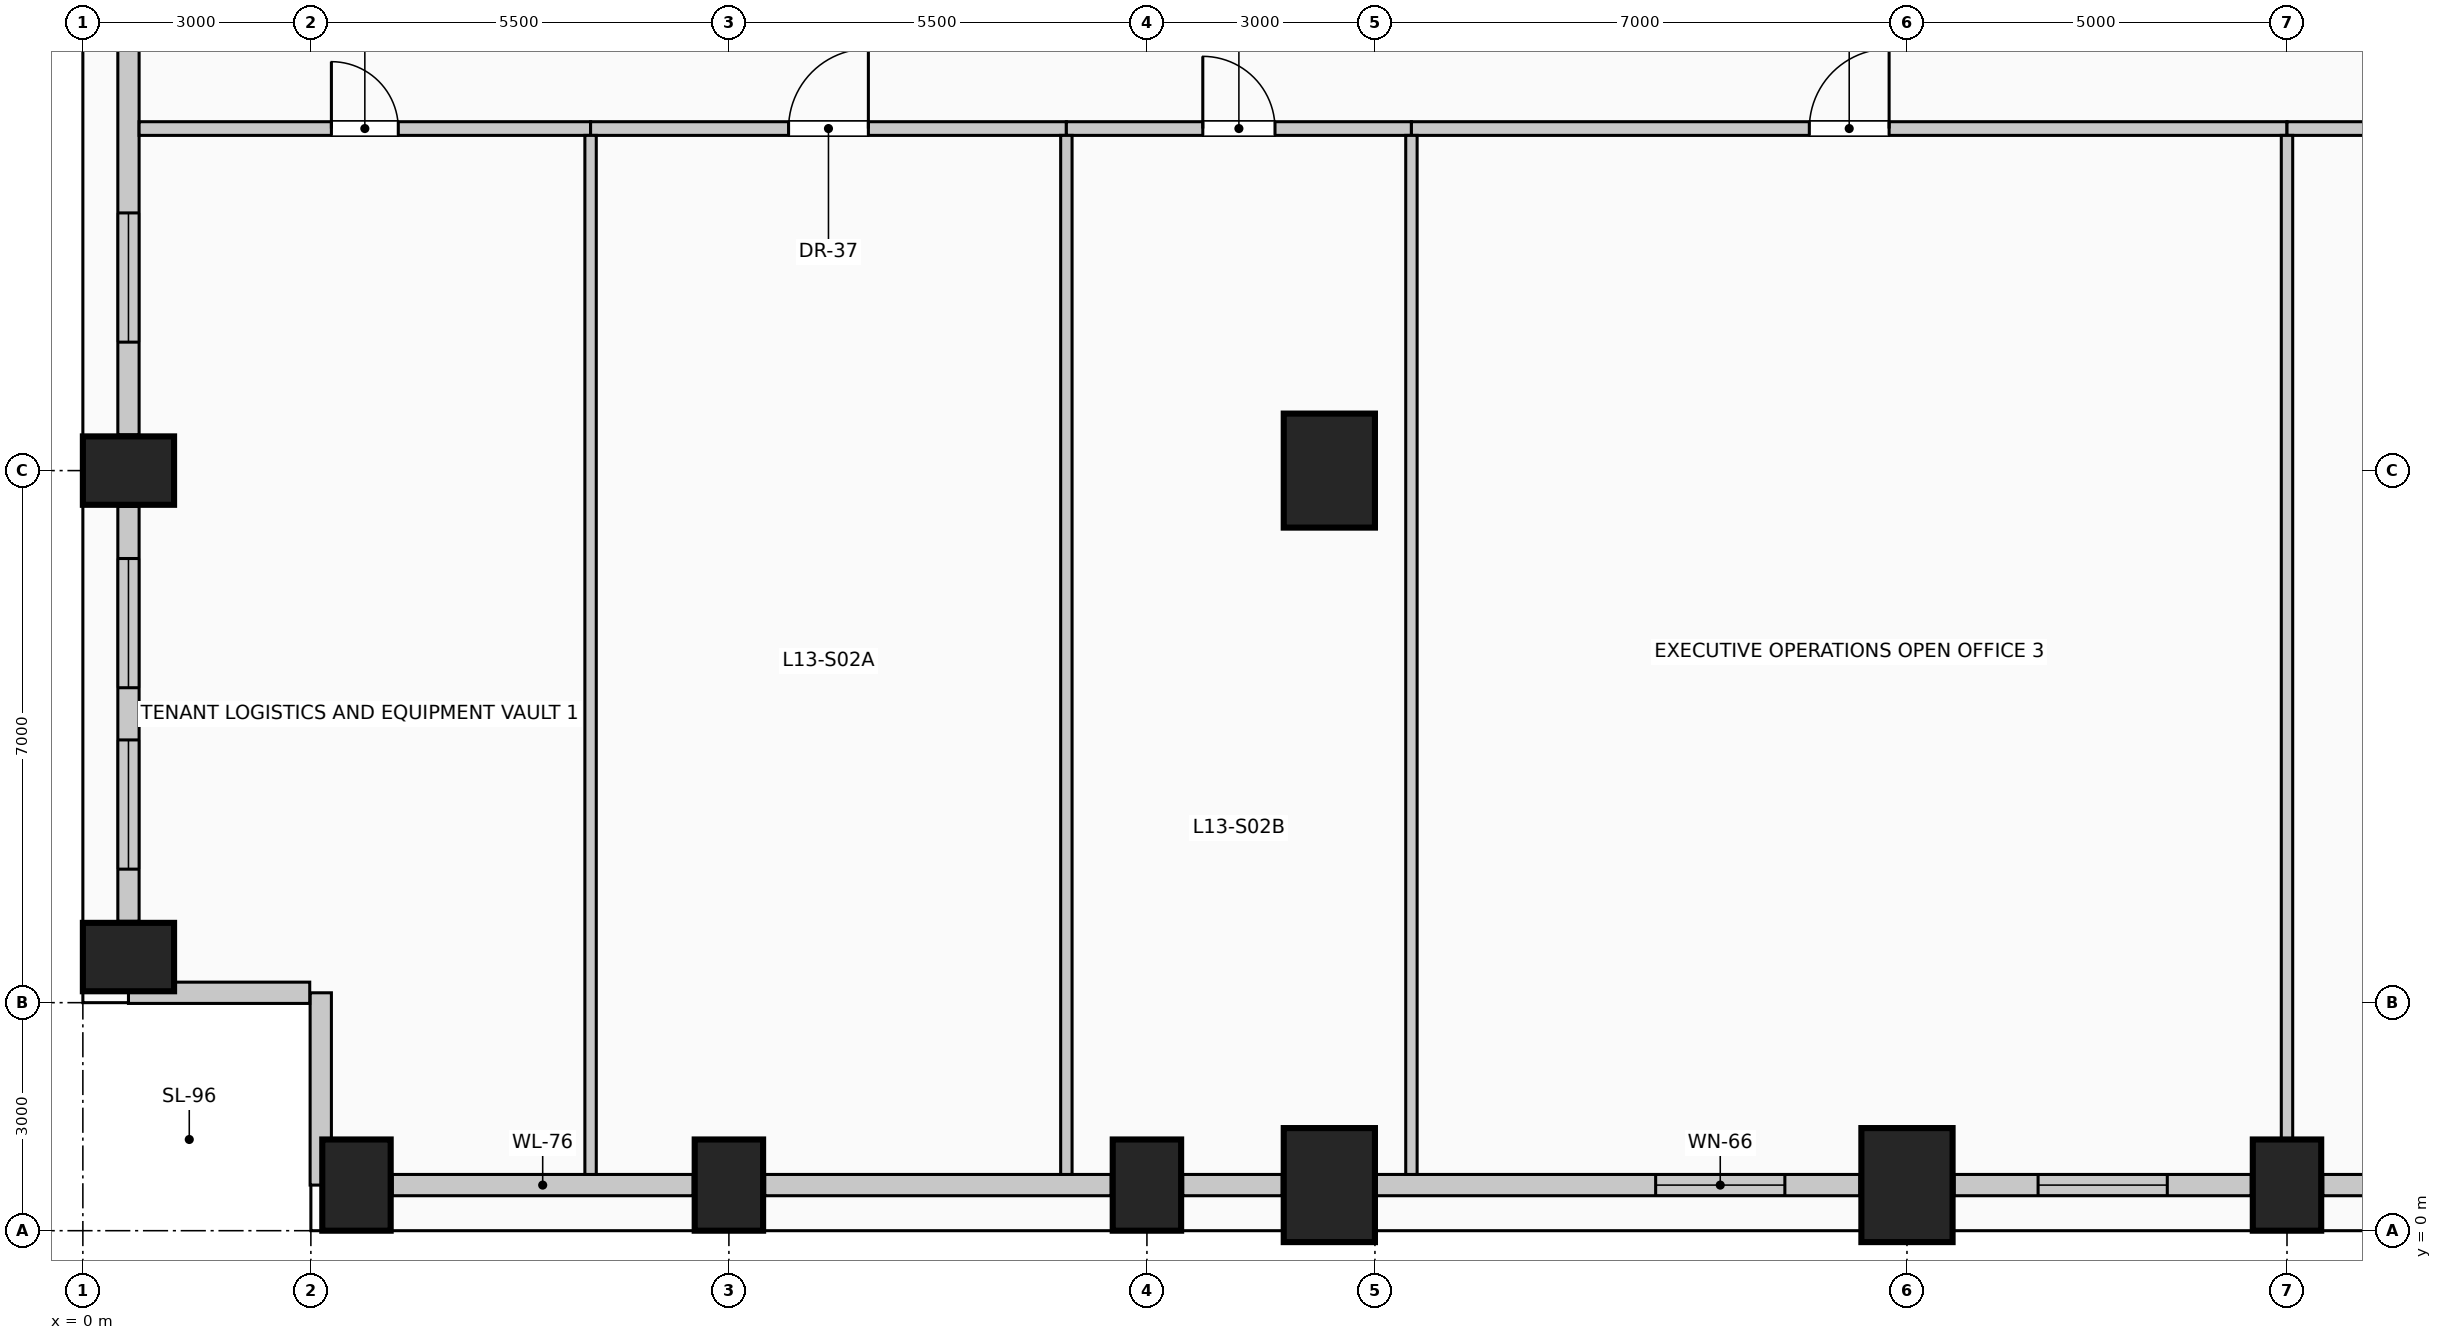
"""IFC4 building model, lengths in metres.
Left out: names, types, materials, properties, quantities, classifications, styles, units other than length and angle.
Written with IfcOpenShell. Run it as: python <this file> out.ifc"""

import sys

from ifc_helpers import new_model, si_unit, direction, frame, frame_2d, origin, origin_2d, place, context, subcontext, project, spatial, rectangle, extrude, element, fill, save


model = new_model("IFC4")
c1 = context("Model", 3, precision=1e-05, world=origin(), true_north=direction((0.0, 1.0)))
c2 = subcontext(c1, "Body", "Model", "MODEL_VIEW")
j1 = project(units=[si_unit("LENGTHUNIT", "METRE"), si_unit("PLANEANGLEUNIT", "RADIAN")], contexts=[c1])
p1 = place(None, origin())
s1 = spatial("IfcSite", under=j1, at=p1, CompositionType="ELEMENT")
p2 = place(p1, origin())
s2 = spatial("IfcBuilding", under=s1, at=p2, CompositionType="ELEMENT")
p3 = place(p2, frame((0.0, 0.0, 54.6)))
s3 = spatial("IfcBuildingStorey", under=s2, at=p3, CompositionType="ELEMENT", Elevation=54.6)
for number, where, z_axis, x_axis in (
    (1, (3.6, 0.6, 0.0), (0.0, 0.0, 1.0), (1.0, 0.0, 0.0)),
    (2, (8.5, 0.6, 0.0), (0.0, 0.0, 1.0), (1.0, 0.0, 0.0)),
    (3, (14.0, 0.6, 0.0), (0.0, 0.0, 1.0), (1.0, 0.0, 0.0)),
):
    element("IfcColumn", number, at=place(p3, frame(where, z_axis=z_axis, x_axis=x_axis)), inside=s3, PredefinedType="COLUMN", context=c2, shape_type="SweptSolid", body=[
        extrude(rectangle(XDim=0.9, YDim=1.2, at=origin_2d()), origin(), (0.0, 0.0, 1.0), 4.0),
    ])
for number, where, z_axis, x_axis in (
    (4, (16.4, 0.6, 0.0), (0.0, 0.0, 1.0), (1.0, 0.0, 0.0)),
    (5, (24.0, 0.6, 0.0), (0.0, 0.0, 1.0), (1.0, 0.0, 0.0)),
):
    element("IfcColumn", number, at=place(p3, frame(where, z_axis=z_axis, x_axis=x_axis)), inside=s3, PredefinedType="COLUMN", context=c2, shape_type="SweptSolid", body=[
        extrude(rectangle(XDim=1.2, YDim=1.5, at=origin_2d()), origin(), (0.0, 0.0, 1.0), 4.0),
    ])
for number, where, z_axis, x_axis in (
    (6, (29.0, 0.6, 0.0), (0.0, 0.0, 1.0), (1.0, 0.0, 0.0)),
    (7, (0.6, 3.6, 0.0), (0.0, 0.0, 1.0), (0.0, 1.0, 0.0)),
    (8, (0.6, 10.0, 0.0), (0.0, 0.0, 1.0), (0.0, 1.0, 0.0)),
):
    element("IfcColumn", number, at=place(p3, frame(where, z_axis=z_axis, x_axis=x_axis)), inside=s3, PredefinedType="COLUMN", context=c2, shape_type="SweptSolid", body=[
        extrude(rectangle(XDim=0.9, YDim=1.2, at=origin_2d()), origin(), (0.0, 0.0, 1.0), 4.0),
    ])
p4 = place(p3, frame((16.4, 10.0, 0.0), z_axis=(0.0, 0.0, 1.0), x_axis=(1.0, 0.0, 0.0)))
e9 = element("IfcColumn", 9, at=p4, inside=s3, PredefinedType="COLUMN", context=c2, shape_type="SweptSolid", body=[
    extrude(rectangle(XDim=1.2, YDim=1.5, at=origin_2d()), origin(), (0.0, 0.0, 1.0), 4.0),
])
p5 = place(p3, frame((8.03, 0.6, 0.0), z_axis=(0.0, 0.0, 1.0), x_axis=(-1.0, 0.0, 0.0)))
e10 = element("IfcWall", 10, at=p5, inside=s3, PredefinedType="SOLIDWALL", context=c2, shape_type="SweptSolid", body=[
    extrude(rectangle(XDim=3.96, YDim=0.28, at=frame_2d((1.98, 0.0))), origin(), (0.0, 0.0, 1.0), 2.85),
])
p6 = place(p3, frame((13.53, 0.6, 0.0), z_axis=(0.0, 0.0, 1.0), x_axis=(-1.0, 0.0, 0.0)))
e11 = element("IfcWall", 11, at=p6, inside=s3, PredefinedType="SOLIDWALL", context=c2, shape_type="SweptSolid", body=[
    extrude(rectangle(XDim=4.56, YDim=0.28, at=frame_2d((2.28, 0.0))), origin(), (0.0, 0.0, 1.0), 2.85),
])
p7 = place(p3, frame((15.78, 0.6, 0.0), z_axis=(0.0, 0.0, 1.0), x_axis=(-1.0, 0.0, 0.0)))
e12 = element("IfcWall", 12, at=p7, inside=s3, PredefinedType="SOLIDWALL", context=c2, shape_type="SweptSolid", body=[
    extrude(rectangle(XDim=1.31, YDim=0.28, at=frame_2d((0.655, 0.0))), origin(), (0.0, 0.0, 1.0), 2.85),
])
p8 = place(p3, frame((23.38, 0.6, 0.0), z_axis=(0.0, 0.0, 1.0), x_axis=(-1.0, 0.0, 0.0)))
e13 = element("IfcWall", 13, at=p8, inside=s3, PredefinedType="SOLIDWALL", context=c2, shape_type="SweptSolid", body=[
    extrude(rectangle(XDim=6.36, YDim=0.28, at=frame_2d((3.18, 0.0))), origin(), (0.0, 0.0, 1.0), 2.85),
])
p9 = place(p8, frame((0.987, 0.0, 0.5)))
e14 = element("IfcOpeningElement", 14, at=p9, cuts=e13, PredefinedType="OPENING", context=c2, shape_type="SweptSolid", body=[
    extrude(rectangle(XDim=1.7, YDim=1.95, at=frame_2d((0.85, 0.975))), frame((0.0, 0.15, 0.0), z_axis=(0.0, -1.0, 0.0), x_axis=(1.0, 0.0, 0.0)), (0.0, 0.0, 1.0), 0.3),
])
p10 = place(p3, frame((28.53, 0.6, 0.0), z_axis=(0.0, 0.0, 1.0), x_axis=(-1.0, 0.0, 0.0)))
e15 = element("IfcWall", 15, at=p10, inside=s3, PredefinedType="SOLIDWALL", context=c2, shape_type="SweptSolid", body=[
    extrude(rectangle(XDim=3.91, YDim=0.28, at=frame_2d((1.955, 0.0))), origin(), (0.0, 0.0, 1.0), 2.85),
])
p11 = place(p10, frame((1.105, 0.0, 0.5)))
e16 = element("IfcOpeningElement", 16, at=p11, cuts=e15, PredefinedType="OPENING", context=c2, shape_type="SweptSolid", body=[
    extrude(rectangle(XDim=1.7, YDim=1.95, at=frame_2d((0.85, 0.975))), frame((0.0, 0.15, 0.0), z_axis=(0.0, -1.0, 0.0), x_axis=(1.0, 0.0, 0.0)), (0.0, 0.0, 1.0), 0.3),
])
p12 = place(p3, frame((33.38, 0.6, 0.0), z_axis=(0.0, 0.0, 1.0), x_axis=(-1.0, 0.0, 0.0)))
e17 = element("IfcWall", 17, at=p12, inside=s3, PredefinedType="SOLIDWALL", context=c2, shape_type="SweptSolid", body=[
    extrude(rectangle(XDim=3.91, YDim=0.28, at=frame_2d((1.955, 0.0))), origin(), (0.0, 0.0, 1.0), 2.85),
])
p13 = place(p12, frame((1.105, 0.0, 0.5)))
e18 = element("IfcOpeningElement", 18, at=p13, cuts=e17, PredefinedType="OPENING", context=c2, shape_type="SweptSolid", body=[
    extrude(rectangle(XDim=1.7, YDim=1.95, at=frame_2d((0.85, 0.975))), frame((0.0, 0.15, 0.0), z_axis=(0.0, -1.0, 0.0), x_axis=(1.0, 0.0, 0.0)), (0.0, 0.0, 1.0), 0.3),
])
p14 = place(p3, frame((0.6, 4.07, 0.0), z_axis=(0.0, 0.0, 1.0), x_axis=(0.0, 1.0, 0.0)))
e19 = element("IfcWall", 19, at=p14, inside=s3, PredefinedType="SOLIDWALL", context=c2, shape_type="SweptSolid", body=[
    extrude(rectangle(XDim=5.46, YDim=0.28, at=frame_2d((2.73, 0.0))), origin(), (0.0, 0.0, 1.0), 2.85),
])
p15 = place(p14, frame((0.687, 0.0, 0.5)))
e20 = element("IfcOpeningElement", 20, at=p15, cuts=e19, PredefinedType="OPENING", context=c2, shape_type="SweptSolid", body=[
    extrude(rectangle(XDim=1.7, YDim=1.95, at=frame_2d((0.85, 0.975))), frame((0.0, 0.15, 0.0), z_axis=(0.0, -1.0, 0.0), x_axis=(1.0, 0.0, 0.0)), (0.0, 0.0, 1.0), 0.3),
])
p16 = place(p14, frame((3.073, 0.0, 0.5)))
e21 = element("IfcOpeningElement", 21, at=p16, cuts=e19, PredefinedType="OPENING", context=c2, shape_type="SweptSolid", body=[
    extrude(rectangle(XDim=1.7, YDim=1.95, at=frame_2d((0.85, 0.975))), frame((0.0, 0.15, 0.0), z_axis=(0.0, -1.0, 0.0), x_axis=(1.0, 0.0, 0.0)), (0.0, 0.0, 1.0), 0.3),
])
p17 = place(p3, frame((0.6, 10.47, 0.0), z_axis=(0.0, 0.0, 1.0), x_axis=(0.0, 1.0, 0.0)))
e22 = element("IfcWall", 22, at=p17, inside=s3, PredefinedType="SOLIDWALL", context=c2, shape_type="SweptSolid", body=[
    extrude(rectangle(XDim=7.06, YDim=0.28, at=frame_2d((3.53, 0.0))), origin(), (0.0, 0.0, 1.0), 2.85),
])
p18 = place(p17, frame((1.22, 0.0, 0.5)))
e23 = element("IfcOpeningElement", 23, at=p18, cuts=e22, PredefinedType="OPENING", context=c2, shape_type="SweptSolid", body=[
    extrude(rectangle(XDim=1.7, YDim=1.95, at=frame_2d((0.85, 0.975))), frame((0.0, 0.15, 0.0), z_axis=(0.0, -1.0, 0.0), x_axis=(1.0, 0.0, 0.0)), (0.0, 0.0, 1.0), 0.3),
])
p19 = place(p3, frame((3.13, 0.6, 0.0), z_axis=(0.0, 0.0, 1.0), x_axis=(0.0, 1.0, 0.0)))
e24 = element("IfcWall", 24, at=p19, inside=s3, PredefinedType="SOLIDWALL", context=c2, shape_type="SweptSolid", body=[
    extrude(rectangle(XDim=2.53, YDim=0.28, at=frame_2d((1.265, 0.0))), origin(), (0.0, 0.0, 1.0), 3.7),
])
p20 = place(p3, frame((2.985, 3.13, 0.0), z_axis=(0.0, 0.0, 1.0), x_axis=(-1.0, 0.0, 0.0)))
e25 = element("IfcWall", 25, at=p20, inside=s3, PredefinedType="SOLIDWALL", context=c2, shape_type="SweptSolid", body=[
    extrude(rectangle(XDim=2.385, YDim=0.28, at=frame_2d((1.192, 0.0))), origin(), (0.0, 0.0, 1.0), 3.7),
])
p21 = place(p3, frame((0.74, 14.5, 0.0), z_axis=(0.0, 0.0, 1.0), x_axis=(1.0, 0.0, 0.0)))
e26 = element("IfcWall", 26, at=p21, inside=s3, PredefinedType="PARTITIONING", context=c2, shape_type="SweptSolid", body=[
    extrude(rectangle(XDim=5.94, YDim=0.18, at=frame_2d((2.97, 0.0))), origin(), (0.0, 0.0, 1.0), 3.7),
])
p22 = place(p21, frame((2.53, 0.0, 0.0)))
e27 = element("IfcOpeningElement", 27, at=p22, cuts=e26, PredefinedType="OPENING", context=c2, shape_type="SweptSolid", body=[
    extrude(rectangle(XDim=0.88, YDim=2.1, at=frame_2d((0.44, 1.05))), frame((0.0, 0.1, 0.0), z_axis=(0.0, -1.0, 0.0), x_axis=(1.0, 0.0, 0.0)), (0.0, 0.0, 1.0), 0.2),
])
p23 = place(p3, frame((6.68, 14.5, 0.0), z_axis=(0.0, 0.0, 1.0), x_axis=(1.0, 0.0, 0.0)))
e28 = element("IfcWall", 28, at=p23, inside=s3, PredefinedType="PARTITIONING", context=c2, shape_type="SweptSolid", body=[
    extrude(rectangle(XDim=6.26, YDim=0.18, at=frame_2d((3.13, 0.0))), origin(), (0.0, 0.0, 1.0), 3.7),
])
p24 = place(p23, frame((2.605, 0.0, 0.0)))
e29 = element("IfcOpeningElement", 29, at=p24, cuts=e28, PredefinedType="OPENING", context=c2, shape_type="SweptSolid", body=[
    extrude(rectangle(XDim=1.05, YDim=2.15, at=frame_2d((0.525, 1.075))), frame((0.0, 0.1, 0.0), z_axis=(0.0, -1.0, 0.0), x_axis=(1.0, 0.0, 0.0)), (0.0, 0.0, 1.0), 0.2),
])
p25 = place(p3, frame((12.94, 14.5, 0.0), z_axis=(0.0, 0.0, 1.0), x_axis=(1.0, 0.0, 0.0)))
e30 = element("IfcWall", 30, at=p25, inside=s3, PredefinedType="PARTITIONING", context=c2, shape_type="SweptSolid", body=[
    extrude(rectangle(XDim=4.54, YDim=0.18, at=frame_2d((2.27, 0.0))), origin(), (0.0, 0.0, 1.0), 3.7),
])
p26 = place(p25, frame((1.795, 0.0, 0.0)))
e31 = element("IfcOpeningElement", 31, at=p26, cuts=e30, PredefinedType="OPENING", context=c2, shape_type="SweptSolid", body=[
    extrude(rectangle(XDim=0.95, YDim=2.15, at=frame_2d((0.475, 1.075))), frame((0.0, 0.1, 0.0), z_axis=(0.0, -1.0, 0.0), x_axis=(1.0, 0.0, 0.0)), (0.0, 0.0, 1.0), 0.2),
])
p27 = place(p3, frame((17.48, 14.5, 0.0), z_axis=(0.0, 0.0, 1.0), x_axis=(1.0, 0.0, 0.0)))
e32 = element("IfcWall", 32, at=p27, inside=s3, PredefinedType="PARTITIONING", context=c2, shape_type="SweptSolid", body=[
    extrude(rectangle(XDim=11.52, YDim=0.18, at=frame_2d((5.76, 0.0))), origin(), (0.0, 0.0, 1.0), 3.7),
])
p28 = place(p27, frame((5.235, 0.0, 0.0)))
e33 = element("IfcOpeningElement", 33, at=p28, cuts=e32, PredefinedType="OPENING", context=c2, shape_type="SweptSolid", body=[
    extrude(rectangle(XDim=1.05, YDim=2.15, at=frame_2d((0.525, 1.075))), frame((0.0, 0.1, 0.0), z_axis=(0.0, -1.0, 0.0), x_axis=(1.0, 0.0, 0.0)), (0.0, 0.0, 1.0), 0.2),
])
p29 = place(p3, frame((29.0, 14.5, 0.0), z_axis=(0.0, 0.0, 1.0), x_axis=(1.0, 0.0, 0.0)))
e34 = element("IfcWall", 34, at=p29, inside=s3, PredefinedType="PARTITIONING", context=c2, shape_type="SweptSolid", body=[
    extrude(rectangle(XDim=12.6, YDim=0.18, at=frame_2d((6.3, 0.0))), origin(), (0.0, 0.0, 1.0), 3.7),
])
p30 = place(p29, frame((5.825, 0.0, 0.0)))
e35 = element("IfcOpeningElement", 35, at=p30, cuts=e34, PredefinedType="OPENING", context=c2, shape_type="SweptSolid", body=[
    extrude(rectangle(XDim=0.95, YDim=2.15, at=frame_2d((0.475, 1.075))), frame((0.0, 0.1, 0.0), z_axis=(0.0, -1.0, 0.0), x_axis=(1.0, 0.0, 0.0)), (0.0, 0.0, 1.0), 0.2),
])
for number, where, z_axis, x_axis in (
    (36, (6.68, 0.74, 0.0), (0.0, 0.0, 1.0), (0.0, 1.0, 0.0)),
    (37, (12.94, 0.74, 0.0), (0.0, 0.0, 1.0), (0.0, 1.0, 0.0)),
    (38, (17.48, 0.74, 0.0), (0.0, 0.0, 1.0), (0.0, 1.0, 0.0)),
):
    element("IfcWall", number, at=place(p3, frame(where, z_axis=z_axis, x_axis=x_axis)), inside=s3, PredefinedType="PARTITIONING", context=c2, shape_type="SweptSolid", body=[
        extrude(rectangle(XDim=13.67, YDim=0.15, at=frame_2d((6.835, 0.0))), origin(), (0.0, 0.0, 1.0), 3.7),
    ])
p31 = place(p3, frame((29.0, 1.2, 0.0), z_axis=(0.0, 0.0, 1.0), x_axis=(0.0, 1.0, 0.0)))
e39 = element("IfcWall", 39, at=p31, inside=s3, PredefinedType="PARTITIONING", context=c2, shape_type="SweptSolid", body=[
    extrude(rectangle(XDim=13.21, YDim=0.15, at=frame_2d((6.605, 0.0))), origin(), (0.0, 0.0, 1.0), 2.995),
])
p32 = place(p9, origin())
e40 = element("IfcWindow", 40, at=p32, inside=s3, PartitioningType="SINGLE_PANEL", PredefinedType="WINDOW", context=c2, shape_type="SweptSolid", body=[
    extrude(rectangle(XDim=1.7, YDim=1.95, at=frame_2d((0.85, 0.975))), frame((0.0, 0.03, 0.0), z_axis=(0.0, -1.0, 0.0), x_axis=(1.0, 0.0, 0.0)), (0.0, 0.0, 1.0), 0.06),
])
fill(e14, e40)
p33 = place(p11, origin())
e41 = element("IfcWindow", 41, at=p33, inside=s3, PartitioningType="SINGLE_PANEL", PredefinedType="WINDOW", context=c2, shape_type="SweptSolid", body=[
    extrude(rectangle(XDim=1.7, YDim=1.95, at=frame_2d((0.85, 0.975))), frame((0.0, 0.03, 0.0), z_axis=(0.0, -1.0, 0.0), x_axis=(1.0, 0.0, 0.0)), (0.0, 0.0, 1.0), 0.06),
])
fill(e16, e41)
p34 = place(p15, origin())
e42 = element("IfcWindow", 42, at=p34, inside=s3, PartitioningType="SINGLE_PANEL", PredefinedType="WINDOW", context=c2, shape_type="SweptSolid", body=[
    extrude(rectangle(XDim=1.7, YDim=1.95, at=frame_2d((0.85, 0.975))), frame((0.0, 0.03, 0.0), z_axis=(0.0, -1.0, 0.0), x_axis=(1.0, 0.0, 0.0)), (0.0, 0.0, 1.0), 0.06),
])
fill(e20, e42)
p35 = place(p16, origin())
e43 = element("IfcWindow", 43, at=p35, inside=s3, PartitioningType="SINGLE_PANEL", PredefinedType="WINDOW", context=c2, shape_type="SweptSolid", body=[
    extrude(rectangle(XDim=1.7, YDim=1.95, at=frame_2d((0.85, 0.975))), frame((0.0, 0.03, 0.0), z_axis=(0.0, -1.0, 0.0), x_axis=(1.0, 0.0, 0.0)), (0.0, 0.0, 1.0), 0.06),
])
fill(e21, e43)
p36 = place(p18, origin())
e44 = element("IfcWindow", 44, at=p36, inside=s3, PartitioningType="SINGLE_PANEL", PredefinedType="WINDOW", context=c2, shape_type="SweptSolid", body=[
    extrude(rectangle(XDim=1.7, YDim=1.95, at=frame_2d((0.85, 0.975))), frame((0.0, 0.03, 0.0), z_axis=(0.0, -1.0, 0.0), x_axis=(1.0, 0.0, 0.0)), (0.0, 0.0, 1.0), 0.06),
])
fill(e23, e44)
p37 = place(p22, origin())
e45 = element("IfcDoor", 45, at=p37, inside=s3, OperationType="SINGLE_SWING_LEFT", PredefinedType="DOOR", context=c2, shape_type="SweptSolid", body=[
    extrude(rectangle(XDim=0.88, YDim=2.1, at=frame_2d((0.44, 1.05))), frame((0.0, 0.025, 0.0), z_axis=(0.0, -1.0, 0.0), x_axis=(1.0, 0.0, 0.0)), (0.0, 0.0, 1.0), 0.05),
])
fill(e27, e45)
p38 = place(p24, origin())
e46 = element("IfcDoor", 46, at=p38, inside=s3, OperationType="SINGLE_SWING_RIGHT", PredefinedType="DOOR", context=c2, shape_type="SweptSolid", body=[
    extrude(rectangle(XDim=1.05, YDim=2.15, at=frame_2d((0.525, 1.075))), frame((0.0, 0.025, 0.0), z_axis=(0.0, -1.0, 0.0), x_axis=(1.0, 0.0, 0.0)), (0.0, 0.0, 1.0), 0.05),
])
fill(e29, e46)
p39 = place(p26, origin())
e47 = element("IfcDoor", 47, at=p39, inside=s3, OperationType="SINGLE_SWING_LEFT", PredefinedType="DOOR", context=c2, shape_type="SweptSolid", body=[
    extrude(rectangle(XDim=0.95, YDim=2.15, at=frame_2d((0.475, 1.075))), frame((0.0, 0.025, 0.0), z_axis=(0.0, -1.0, 0.0), x_axis=(1.0, 0.0, 0.0)), (0.0, 0.0, 1.0), 0.05),
])
fill(e31, e47)
p40 = place(p28, origin())
e48 = element("IfcDoor", 48, at=p40, inside=s3, OperationType="SINGLE_SWING_RIGHT", PredefinedType="DOOR", context=c2, shape_type="SweptSolid", body=[
    extrude(rectangle(XDim=1.05, YDim=2.15, at=frame_2d((0.525, 1.075))), frame((0.0, 0.025, 0.0), z_axis=(0.0, -1.0, 0.0), x_axis=(1.0, 0.0, 0.0)), (0.0, 0.0, 1.0), 0.05),
])
fill(e33, e48)
save(model, sys.argv[1])
